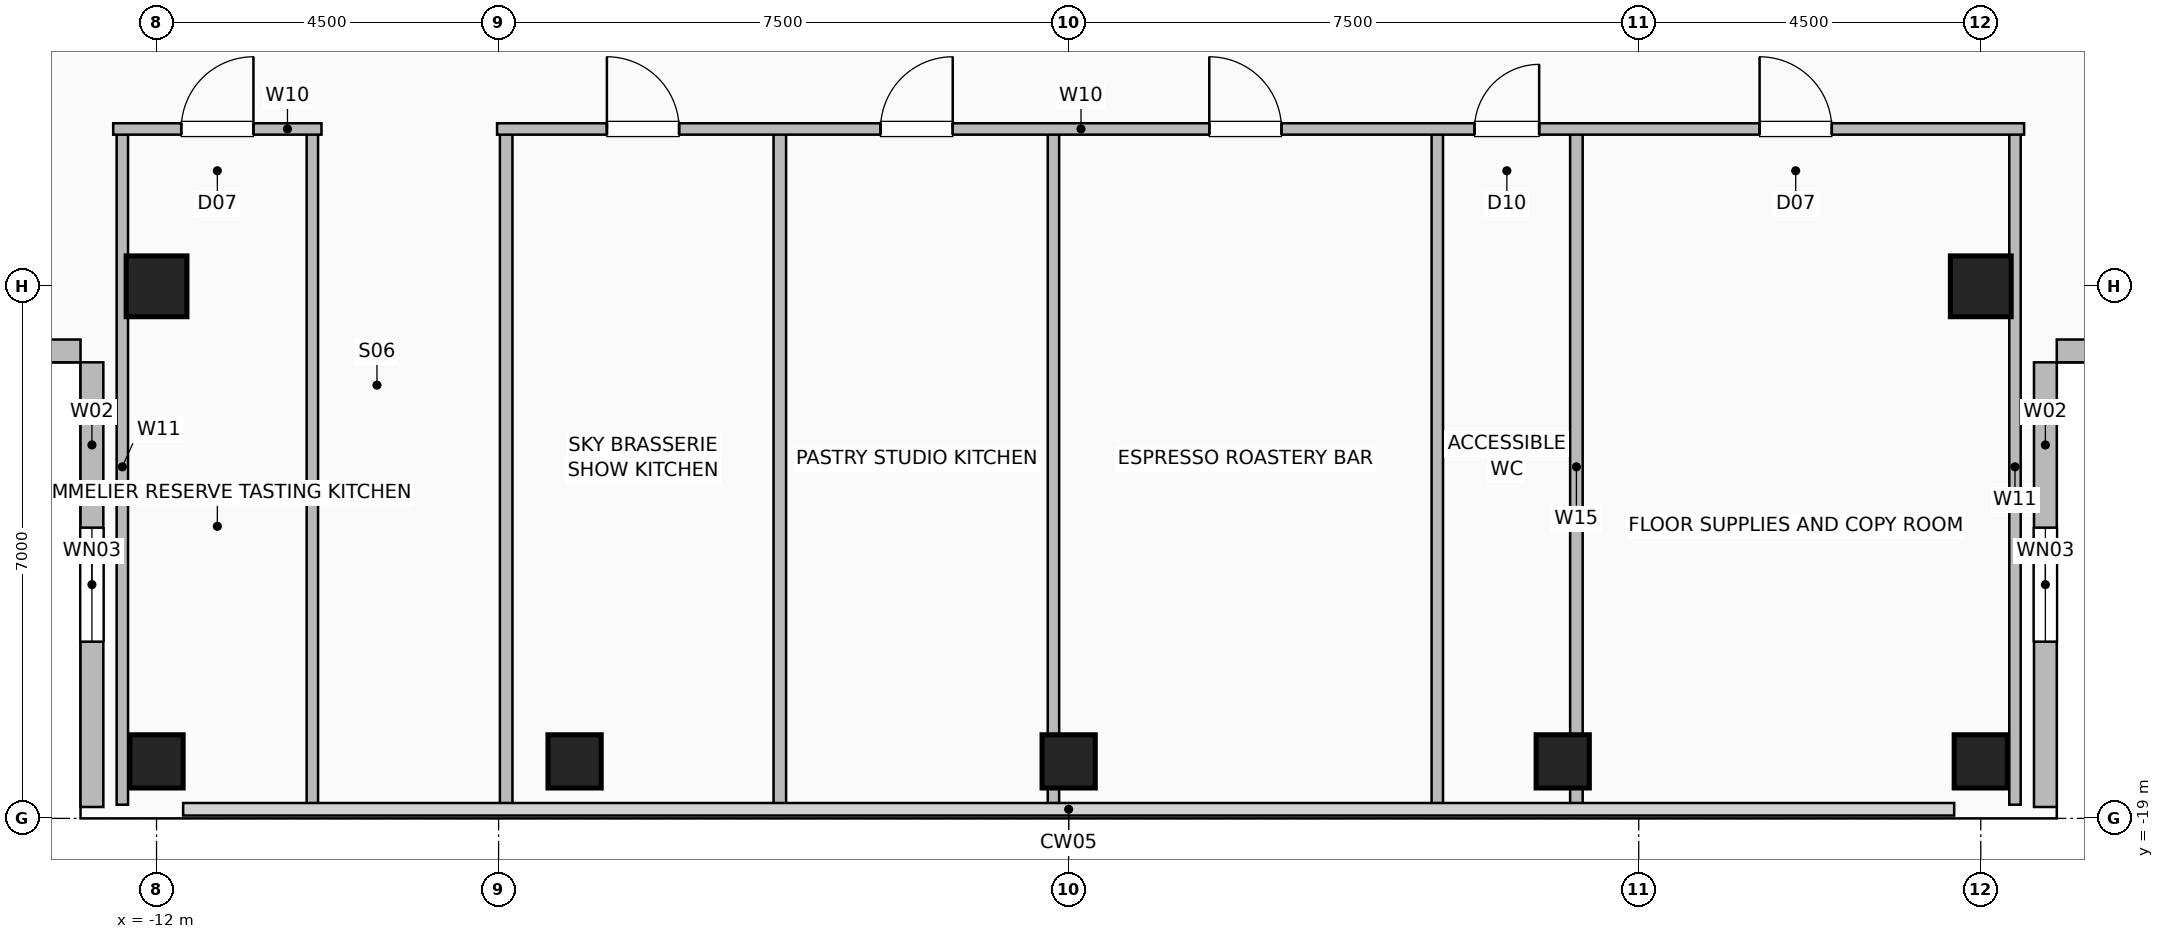
"""IFC4 building model, lengths in metres.
Left out: names, types, materials, properties, quantities, classifications, styles, units other than length and angle.
Written with IfcOpenShell. Run it as: python <this file> out.ifc"""

import sys

from ifc_helpers import new_model, si_unit, direction, frame, frame_2d, origin, origin_2d, place, context, subcontext, project, spatial, rectangle, hollow_rectangle, extrude, element, fill, save


model = new_model("IFC4")
c1 = context("Model", 3, precision=1e-05, world=origin(), true_north=direction((0.0, 1.0)))
c2 = subcontext(c1, "Body", "Model", "MODEL_VIEW")
j1 = project(units=[si_unit("LENGTHUNIT", "METRE"), si_unit("PLANEANGLEUNIT", "RADIAN")], contexts=[c1])
p1 = place(None, origin())
s1 = spatial("IfcSite", under=j1, at=p1, CompositionType="ELEMENT")
p2 = place(p1, origin())
s2 = spatial("IfcBuilding", under=s1, at=p2, CompositionType="ELEMENT")
p3 = place(p2, frame((0.0, 0.0, 297.2)))
s3 = spatial("IfcBuildingStorey", under=s2, at=p3, CompositionType="ELEMENT", Elevation=297.2)
for number, where, z_axis, x_axis in (
    (1, (-12.0, -18.25, 0.0), (0.0, 0.0, 1.0), (1.0, 0.0, 0.0)),
    (2, (-6.5, -18.25, 0.0), (0.0, 0.0, 1.0), (1.0, 0.0, 0.0)),
    (3, (0.0, -18.25, 0.0), (0.0, 0.0, 1.0), (1.0, 0.0, 0.0)),
    (4, (6.5, -18.25, 0.0), (0.0, 0.0, 1.0), (1.0, 0.0, 0.0)),
    (5, (12.0, -18.25, 0.0), (0.0, 0.0, 1.0), (1.0, 0.0, 0.0)),
):
    element("IfcColumn", number, at=place(p3, frame(where, z_axis=z_axis, x_axis=x_axis)), inside=s3, PredefinedType="COLUMN", context=c2, shape_type="SweptSolid", body=[
        extrude(hollow_rectangle(XDim=0.7, YDim=0.7, WallThickness=0.035, at=origin_2d()), origin(), (0.0, 0.0, 1.0), 3.2),
    ])
for number, where, z_axis, x_axis in (
    (6, (-12.0, -12.0, 0.0), (0.0, 0.0, 1.0), (1.0, 0.0, 0.0)),
    (7, (12.0, -12.0, 0.0), (0.0, 0.0, 1.0), (1.0, 0.0, 0.0)),
):
    element("IfcColumn", number, at=place(p3, frame(where, z_axis=z_axis, x_axis=x_axis)), inside=s3, PredefinedType="COLUMN", context=c2, shape_type="SweptSolid", body=[
        extrude(hollow_rectangle(XDim=0.8, YDim=0.8, WallThickness=0.04, at=origin_2d()), origin(), (0.0, 0.0, 1.0), 3.2),
    ])
p4 = place(p3, frame((-12.85, -18.85, 0.0), z_axis=(0.0, 0.0, 1.0), x_axis=(0.0, 1.0, 0.0)))
e8 = element("IfcWall", 8, at=p4, inside=s3, PredefinedType="SOLIDWALL", context=c2, shape_type="SweptSolid", body=[
    extrude(rectangle(XDim=5.85, YDim=0.3, at=frame_2d((2.925, 0.0))), origin(), (0.0, 0.0, 1.0), 3.2),
])
p5 = place(p4, frame((2.175, 0.0, 0.9)))
e9 = element("IfcOpeningElement", 9, at=p5, cuts=e8, PredefinedType="OPENING", context=c2, shape_type="SweptSolid", body=[
    extrude(rectangle(XDim=1.5, YDim=1.8, at=frame_2d((0.75, 0.9))), frame((0.0, 0.16, 0.0), z_axis=(0.0, -1.0, 0.0), x_axis=(1.0, 0.0, 0.0)), (0.0, 0.0, 1.0), 0.32),
])
p6 = place(p3, frame((-18.85, -12.85, 0.0), z_axis=(0.0, 0.0, 1.0), x_axis=(1.0, 0.0, 0.0)))
e10 = element("IfcWall", 10, at=p6, inside=s3, PredefinedType="SOLIDWALL", context=c2, shape_type="SweptSolid", body=[
    extrude(rectangle(XDim=5.85, YDim=0.3, at=frame_2d((2.925, 0.0))), origin(), (0.0, 0.0, 1.0), 3.2),
])
p7 = place(p3, frame((12.85, -18.85, 0.0), z_axis=(0.0, 0.0, 1.0), x_axis=(0.0, 1.0, 0.0)))
e11 = element("IfcWall", 11, at=p7, inside=s3, PredefinedType="SOLIDWALL", context=c2, shape_type="SweptSolid", body=[
    extrude(rectangle(XDim=5.85, YDim=0.3, at=frame_2d((2.925, 0.0))), origin(), (0.0, 0.0, 1.0), 3.2),
])
p8 = place(p7, frame((2.175, 0.0, 0.9)))
e12 = element("IfcOpeningElement", 12, at=p8, cuts=e11, PredefinedType="OPENING", context=c2, shape_type="SweptSolid", body=[
    extrude(rectangle(XDim=1.5, YDim=1.8, at=frame_2d((0.75, 0.9))), frame((0.0, 0.16, 0.0), z_axis=(0.0, -1.0, 0.0), x_axis=(1.0, 0.0, 0.0)), (0.0, 0.0, 1.0), 0.32),
])
p9 = place(p3, frame((18.85, -12.85, 0.0), z_axis=(0.0, 0.0, 1.0), x_axis=(-1.0, 0.0, 0.0)))
e13 = element("IfcWall", 13, at=p9, inside=s3, PredefinedType="SOLIDWALL", context=c2, shape_type="SweptSolid", body=[
    extrude(rectangle(XDim=5.85, YDim=0.3, at=frame_2d((2.925, 0.0))), origin(), (0.0, 0.0, 1.0), 3.2),
])
for number, where, z_axis, x_axis in (
    (14, (-12.45, -18.82, 0.0), (0.0, 0.0, 1.0), (0.0, 1.0, 0.0)),
    (15, (-9.95, -18.82, 0.0), (0.0, 0.0, 1.0), (0.0, 1.0, 0.0)),
):
    element("IfcWall", number, at=place(p3, frame(where, z_axis=z_axis, x_axis=x_axis)), inside=s3, PredefinedType="PARTITIONING", context=c2, shape_type="SweptSolid", body=[
        extrude(rectangle(XDim=8.89, YDim=0.15, at=frame_2d((4.445, 0.0))), origin(), (0.0, 0.0, 1.0), 3.2),
    ])
p10 = place(p3, frame((-12.57, -9.93, 0.0), z_axis=(0.0, 0.0, 1.0), x_axis=(1.0, 0.0, 0.0)))
e16 = element("IfcWall", 16, at=p10, inside=s3, PredefinedType="PARTITIONING", context=c2, shape_type="SweptSolid", body=[
    extrude(rectangle(XDim=2.74, YDim=0.15, at=frame_2d((1.37, 0.0))), origin(), (0.0, 0.0, 1.0), 3.2),
])
p11 = place(p10, frame((0.895, 0.0, 0.0)))
e17 = element("IfcOpeningElement", 17, at=p11, cuts=e16, PredefinedType="OPENING", context=c2, shape_type="SweptSolid", body=[
    extrude(rectangle(XDim=0.95, YDim=2.06, at=frame_2d((0.475, 1.03))), frame((0.0, 0.085, 0.0), z_axis=(0.0, -1.0, 0.0), x_axis=(1.0, 0.0, 0.0)), (0.0, 0.0, 1.0), 0.17),
])
p12 = place(p3, frame((6.68, -18.82, 0.0), z_axis=(0.0, 0.0, 1.0), x_axis=(0.0, 1.0, 0.0)))
e18 = element("IfcWall", 18, at=p12, inside=s3, PredefinedType="PLUMBINGWALL", context=c2, shape_type="SweptSolid", body=[
    extrude(rectangle(XDim=8.89, YDim=0.165, at=frame_2d((4.445, 0.0))), origin(), (0.0, 0.0, 1.0), 3.2),
])
p13 = place(p3, frame((-7.4, -18.82, 0.0), z_axis=(0.0, 0.0, 1.0), x_axis=(0.0, 1.0, 0.0)))
e19 = element("IfcWall", 19, at=p13, inside=s3, PredefinedType="PLUMBINGWALL", context=c2, shape_type="SweptSolid", body=[
    extrude(rectangle(XDim=8.89, YDim=0.165, at=frame_2d((4.445, 0.0))), origin(), (0.0, 0.0, 1.0), 2.075),
])
p14 = place(p3, frame((-3.8, -18.82, 0.0), z_axis=(0.0, 0.0, 1.0), x_axis=(0.0, 1.0, 0.0)))
e20 = element("IfcWall", 20, at=p14, inside=s3, PredefinedType="PLUMBINGWALL", context=c2, shape_type="SweptSolid", body=[
    extrude(rectangle(XDim=8.89, YDim=0.165, at=frame_2d((4.445, 0.0))), origin(), (0.0, 0.0, 1.0), 3.2),
])
p15 = place(p3, frame((-0.2, -18.82, 0.0), z_axis=(0.0, 0.0, 1.0), x_axis=(0.0, 1.0, 0.0)))
e21 = element("IfcWall", 21, at=p15, inside=s3, PredefinedType="PARTITIONING", context=c2, shape_type="SweptSolid", body=[
    extrude(rectangle(XDim=8.89, YDim=0.15, at=frame_2d((4.445, 0.0))), origin(), (0.0, 0.0, 1.0), 2.075),
])
for number, where, z_axis, x_axis in (
    (22, (4.85, -18.82, 0.0), (0.0, 0.0, 1.0), (0.0, 1.0, 0.0)),
    (23, (12.45, -18.82, 0.0), (0.0, 0.0, 1.0), (0.0, 1.0, 0.0)),
):
    element("IfcWall", number, at=place(p3, frame(where, z_axis=z_axis, x_axis=x_axis)), inside=s3, PredefinedType="PARTITIONING", context=c2, shape_type="SweptSolid", body=[
        extrude(rectangle(XDim=8.89, YDim=0.15, at=frame_2d((4.445, 0.0))), origin(), (0.0, 0.0, 1.0), 3.2),
    ])
p16 = place(p3, frame((-7.52, -9.93, 0.0), z_axis=(0.0, 0.0, 1.0), x_axis=(1.0, 0.0, 0.0)))
e24 = element("IfcWall", 24, at=p16, inside=s3, PredefinedType="PARTITIONING", context=c2, shape_type="SweptSolid", body=[
    extrude(rectangle(XDim=20.09, YDim=0.15, at=frame_2d((10.045, 0.0))), origin(), (0.0, 0.0, 1.0), 3.2),
])
p17 = place(p16, frame((1.445, 0.0, 0.0)))
e25 = element("IfcOpeningElement", 25, at=p17, cuts=e24, PredefinedType="OPENING", context=c2, shape_type="SweptSolid", body=[
    extrude(rectangle(XDim=0.95, YDim=2.06, at=frame_2d((0.475, 1.03))), frame((0.0, 0.085, 0.0), z_axis=(0.0, -1.0, 0.0), x_axis=(1.0, 0.0, 0.0)), (0.0, 0.0, 1.0), 0.17),
])
p18 = place(p16, frame((5.045, 0.0, 0.0)))
e26 = element("IfcOpeningElement", 26, at=p18, cuts=e24, PredefinedType="OPENING", context=c2, shape_type="SweptSolid", body=[
    extrude(rectangle(XDim=0.95, YDim=2.06, at=frame_2d((0.475, 1.03))), frame((0.0, 0.085, 0.0), z_axis=(0.0, -1.0, 0.0), x_axis=(1.0, 0.0, 0.0)), (0.0, 0.0, 1.0), 0.17),
])
p19 = place(p16, frame((9.37, 0.0, 0.0)))
e27 = element("IfcOpeningElement", 27, at=p19, cuts=e24, PredefinedType="OPENING", context=c2, shape_type="SweptSolid", body=[
    extrude(rectangle(XDim=0.95, YDim=2.06, at=frame_2d((0.475, 1.03))), frame((0.0, 0.085, 0.0), z_axis=(0.0, -1.0, 0.0), x_axis=(1.0, 0.0, 0.0)), (0.0, 0.0, 1.0), 0.17),
])
p20 = place(p16, frame((12.86, 0.0, 0.0)))
e28 = element("IfcOpeningElement", 28, at=p20, cuts=e24, PredefinedType="OPENING", context=c2, shape_type="SweptSolid", body=[
    extrude(rectangle(XDim=0.85, YDim=2.05, at=frame_2d((0.425, 1.025))), frame((0.0, 0.085, 0.0), z_axis=(0.0, -1.0, 0.0), x_axis=(1.0, 0.0, 0.0)), (0.0, 0.0, 1.0), 0.17),
])
p21 = place(p16, frame((16.61, 0.0, 0.0)))
e29 = element("IfcOpeningElement", 29, at=p21, cuts=e24, PredefinedType="OPENING", context=c2, shape_type="SweptSolid", body=[
    extrude(rectangle(XDim=0.95, YDim=2.06, at=frame_2d((0.475, 1.03))), frame((0.0, 0.085, 0.0), z_axis=(0.0, -1.0, 0.0), x_axis=(1.0, 0.0, 0.0)), (0.0, 0.0, 1.0), 0.17),
])
p22 = place(p5, origin())
e30 = element("IfcWindow", 30, at=p22, inside=s3, PartitioningType="SINGLE_PANEL", PredefinedType="WINDOW", context=c2, shape_type="SweptSolid", body=[
    extrude(rectangle(XDim=1.5, YDim=1.8, at=frame_2d((0.75, 0.9))), frame((0.0, 0.03, 0.0), z_axis=(0.0, -1.0, 0.0), x_axis=(1.0, 0.0, 0.0)), (0.0, 0.0, 1.0), 0.06),
])
fill(e9, e30)
p23 = place(p8, origin())
e31 = element("IfcWindow", 31, at=p23, inside=s3, PartitioningType="SINGLE_PANEL", PredefinedType="WINDOW", context=c2, shape_type="SweptSolid", body=[
    extrude(rectangle(XDim=1.5, YDim=1.8, at=frame_2d((0.75, 0.9))), frame((0.0, 0.03, 0.0), z_axis=(0.0, -1.0, 0.0), x_axis=(1.0, 0.0, 0.0)), (0.0, 0.0, 1.0), 0.06),
])
fill(e12, e31)
p24 = place(p11, origin())
e32 = element("IfcDoor", 32, at=p24, inside=s3, OperationType="SINGLE_SWING_RIGHT", PredefinedType="DOOR", context=c2, shape_type="SweptSolid", body=[
    extrude(rectangle(XDim=0.95, YDim=2.06, at=frame_2d((0.475, 1.03))), frame((0.0, 0.025, 0.0), z_axis=(0.0, -1.0, 0.0), x_axis=(1.0, 0.0, 0.0)), (0.0, 0.0, 1.0), 0.05),
])
fill(e17, e32)
p25 = place(p17, origin())
e33 = element("IfcDoor", 33, at=p25, inside=s3, OperationType="SINGLE_SWING_LEFT", PredefinedType="DOOR", context=c2, shape_type="SweptSolid", body=[
    extrude(rectangle(XDim=0.95, YDim=2.06, at=frame_2d((0.475, 1.03))), frame((0.0, 0.025, 0.0), z_axis=(0.0, -1.0, 0.0), x_axis=(1.0, 0.0, 0.0)), (0.0, 0.0, 1.0), 0.05),
])
fill(e25, e33)
p26 = place(p18, origin())
e34 = element("IfcDoor", 34, at=p26, inside=s3, OperationType="SINGLE_SWING_RIGHT", PredefinedType="DOOR", context=c2, shape_type="SweptSolid", body=[
    extrude(rectangle(XDim=0.95, YDim=2.06, at=frame_2d((0.475, 1.03))), frame((0.0, 0.025, 0.0), z_axis=(0.0, -1.0, 0.0), x_axis=(1.0, 0.0, 0.0)), (0.0, 0.0, 1.0), 0.05),
])
fill(e26, e34)
p27 = place(p19, origin())
e35 = element("IfcDoor", 35, at=p27, inside=s3, OperationType="SINGLE_SWING_LEFT", PredefinedType="DOOR", context=c2, shape_type="SweptSolid", body=[
    extrude(rectangle(XDim=0.95, YDim=2.06, at=frame_2d((0.475, 1.03))), frame((0.0, 0.025, 0.0), z_axis=(0.0, -1.0, 0.0), x_axis=(1.0, 0.0, 0.0)), (0.0, 0.0, 1.0), 0.05),
])
fill(e27, e35)
p28 = place(p20, origin())
e36 = element("IfcDoor", 36, at=p28, inside=s3, OperationType="SINGLE_SWING_RIGHT", PredefinedType="DOOR", context=c2, shape_type="SweptSolid", body=[
    extrude(rectangle(XDim=0.85, YDim=2.05, at=frame_2d((0.425, 1.025))), frame((0.0, 0.025, 0.0), z_axis=(0.0, -1.0, 0.0), x_axis=(1.0, 0.0, 0.0)), (0.0, 0.0, 1.0), 0.05),
])
fill(e28, e36)
p29 = place(p21, origin())
e37 = element("IfcDoor", 37, at=p29, inside=s3, OperationType="SINGLE_SWING_LEFT", PredefinedType="DOOR", context=c2, shape_type="SweptSolid", body=[
    extrude(rectangle(XDim=0.95, YDim=2.06, at=frame_2d((0.475, 1.03))), frame((0.0, 0.025, 0.0), z_axis=(0.0, -1.0, 0.0), x_axis=(1.0, 0.0, 0.0)), (0.0, 0.0, 1.0), 0.05),
])
fill(e29, e37)
save(model, sys.argv[1])
